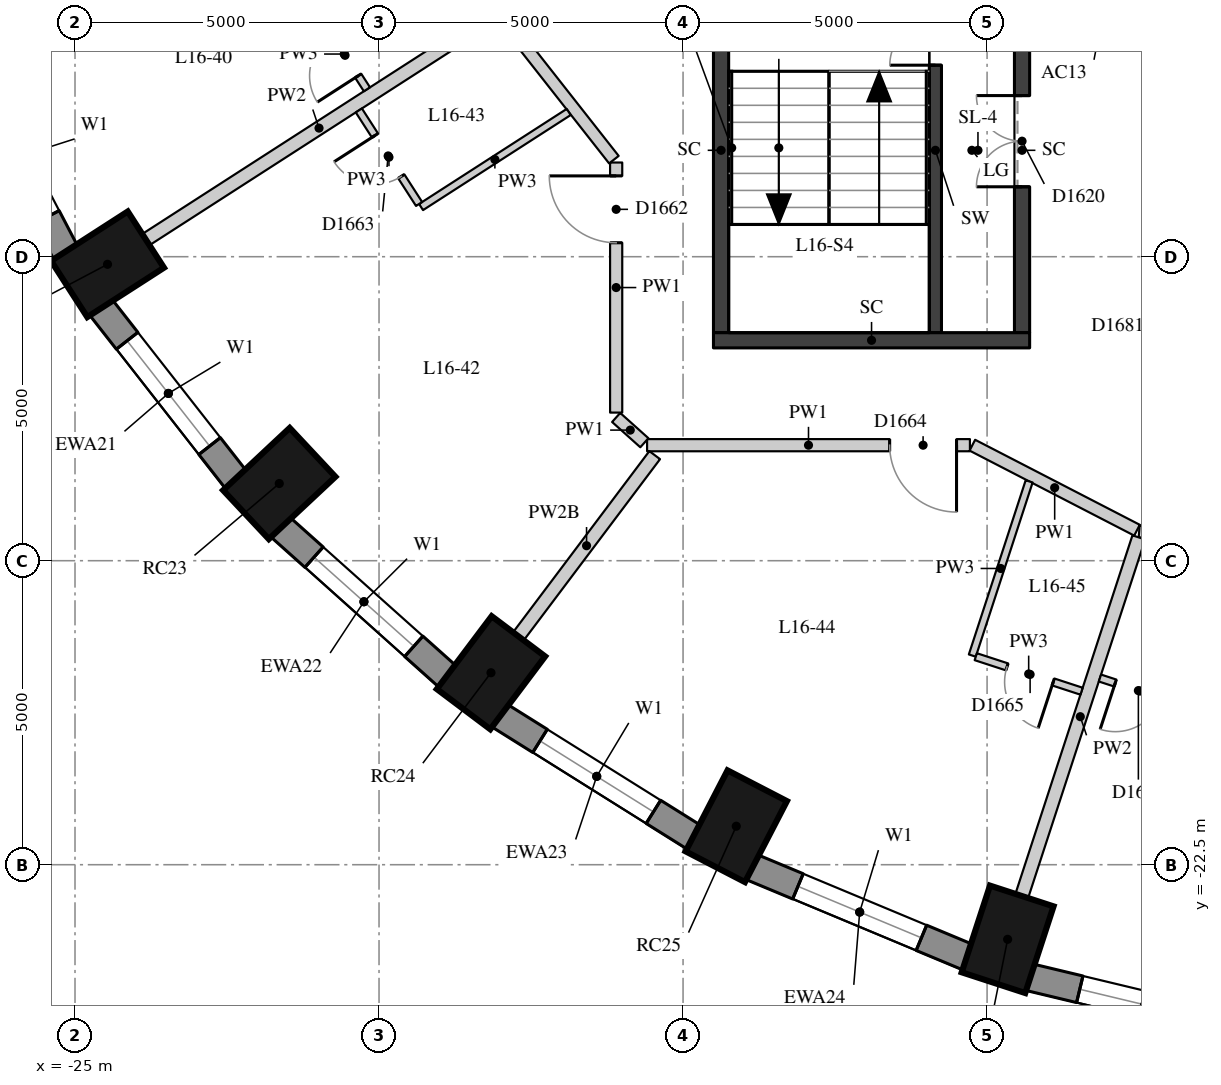
"""IFC4 building model, lengths in metres.
Left out: names, types, materials, properties, quantities, classifications, styles, units other than length and angle.
Written with IfcOpenShell. Run it as: python <this file> out.ifc"""

import sys

from ifc_helpers import new_model, si_unit, direction, frame, frame_2d, origin, origin_2d, place, context, subcontext, project, spatial, rectangle, extrude, element, fill, save


model = new_model("IFC4")
c1 = context("Model", 3, precision=1e-05, world=origin(), true_north=direction((0.0, 1.0)))
c2 = subcontext(c1, "Body", "Model", "MODEL_VIEW")
j1 = project(units=[si_unit("LENGTHUNIT", "METRE"), si_unit("PLANEANGLEUNIT", "RADIAN")], contexts=[c1])
p1 = place(None, origin())
s1 = spatial("IfcSite", under=j1, at=p1, CompositionType="ELEMENT")
p2 = place(p1, origin())
s2 = spatial("IfcBuilding", under=s1, at=p2, CompositionType="ELEMENT")
p3 = place(p2, frame((0.0, 0.0, 61.3)))
s3 = spatial("IfcBuildingStorey", under=s2, at=p3, CompositionType="ELEMENT", Elevation=61.3)
for number, where, z_axis, x_axis in (
    (1, (-24.465, -12.625, 0.0), (0.0, 0.0, 1.0), (-0.841, -0.541, 0.0)),
    (2, (-21.641, -16.23, 0.0), (0.0, 0.0, 1.0), (-0.73, -0.683, 0.0)),
    (3, (-18.159, -19.343, 0.0), (0.0, 0.0, 1.0), (-0.601, -0.799, 0.0)),
    (4, (-14.125, -21.867, 0.0), (0.0, 0.0, 1.0), (-0.46, -0.888, 0.0)),
    (5, (-9.662, -23.727, 0.0), (0.0, 0.0, 1.0), (-0.31, -0.951, 0.0)),
):
    element("IfcColumn", number, at=place(p3, frame(where, z_axis=z_axis, x_axis=x_axis)), inside=s3, PredefinedType="COLUMN", context=c2, shape_type="SweptSolid", body=[
        extrude(rectangle(XDim=1.5, YDim=1.1, at=origin_2d()), origin(), (0.0, 0.0, 1.0), 3.3),
    ])
p4 = place(p3, frame((-26.786, -9.305, 0.0), z_axis=(0.0, 0.0, 1.0), x_axis=(0.462492775226, -0.886623050041, 0.0)))
e6 = element("IfcWall", 6, at=p4, inside=s3, PredefinedType="SOLIDWALL", context=c2, shape_type="SweptSolid", body=[
    extrude(rectangle(XDim=3.532, YDim=0.45, at=frame_2d((1.766, 0.0))), origin(), (0.0, 0.0, 1.0), 3.02),
])
p5 = place(p4, frame((0.666, 0.0, 0.4)))
e7 = element("IfcOpeningElement", 7, at=p5, cuts=e6, PredefinedType="OPENING", context=c2, shape_type="SweptSolid", body=[
    extrude(rectangle(XDim=2.2, YDim=1.75, at=frame_2d((1.1, 0.875))), frame((0.0, 0.235, 0.0), z_axis=(0.0, -1.0, 0.0), x_axis=(1.0, 0.0, 0.0)), (0.0, 0.0, 1.0), 0.47),
])
p6 = place(p3, frame((-24.578, -13.328, 0.0), z_axis=(0.0, 0.0, 1.0), x_axis=(0.616661975264, -0.787228053529, 0.0)))
e8 = element("IfcWall", 8, at=p6, inside=s3, PredefinedType="SOLIDWALL", context=c2, shape_type="SweptSolid", body=[
    extrude(rectangle(XDim=3.61, YDim=0.45, at=frame_2d((1.805, 0.0))), origin(), (0.0, 0.0, 1.0), 3.02),
])
p7 = place(p6, frame((0.705, 0.0, 0.4)))
e9 = element("IfcOpeningElement", 9, at=p7, cuts=e8, PredefinedType="OPENING", context=c2, shape_type="SweptSolid", body=[
    extrude(rectangle(XDim=2.2, YDim=1.75, at=frame_2d((1.1, 0.875))), frame((0.0, 0.235, 0.0), z_axis=(0.0, -1.0, 0.0), x_axis=(1.0, 0.0, 0.0)), (0.0, 0.0, 1.0), 0.47),
])
p8 = place(p3, frame((-21.627, -16.943, 0.0), z_axis=(0.0, 0.0, 1.0), x_axis=(0.745526233716, -0.66647628228, 0.0)))
e10 = element("IfcWall", 10, at=p8, inside=s3, PredefinedType="SOLIDWALL", context=c2, shape_type="SweptSolid", body=[
    extrude(rectangle(XDim=3.697, YDim=0.45, at=frame_2d((1.848, 0.0))), origin(), (0.0, 0.0, 1.0), 3.02),
])
p9 = place(p8, frame((0.749, 0.0, 0.4)))
e11 = element("IfcOpeningElement", 11, at=p9, cuts=e10, PredefinedType="OPENING", context=c2, shape_type="SweptSolid", body=[
    extrude(rectangle(XDim=2.2, YDim=1.75, at=frame_2d((1.1, 0.875))), frame((0.0, 0.235, 0.0), z_axis=(0.0, -1.0, 0.0), x_axis=(1.0, 0.0, 0.0)), (0.0, 0.0, 1.0), 0.47),
])
p10 = place(p3, frame((-18.023, -20.044, 0.0), z_axis=(0.0, 0.0, 1.0), x_axis=(0.847635480093, -0.530579016629, 0.0)))
e12 = element("IfcWall", 12, at=p10, inside=s3, PredefinedType="SOLIDWALL", context=c2, shape_type="SweptSolid", body=[
    extrude(rectangle(XDim=3.782, YDim=0.45, at=frame_2d((1.891, 0.0))), origin(), (0.0, 0.0, 1.0), 3.02),
])
p11 = place(p10, frame((0.791, 0.0, 0.4)))
e13 = element("IfcOpeningElement", 13, at=p11, cuts=e12, PredefinedType="OPENING", context=c2, shape_type="SweptSolid", body=[
    extrude(rectangle(XDim=2.2, YDim=1.75, at=frame_2d((1.1, 0.875))), frame((0.0, 0.235, 0.0), z_axis=(0.0, -1.0, 0.0), x_axis=(1.0, 0.0, 0.0)), (0.0, 0.0, 1.0), 0.47),
])
p12 = place(p3, frame((-13.875, -22.537, 0.0), z_axis=(0.0, 0.0, 1.0), x_axis=(0.923031964282, -0.384723267966, 0.0)))
e14 = element("IfcWall", 14, at=p12, inside=s3, PredefinedType="SOLIDWALL", context=c2, shape_type="SweptSolid", body=[
    extrude(rectangle(XDim=3.856, YDim=0.45, at=frame_2d((1.928, 0.0))), origin(), (0.0, 0.0, 1.0), 3.02),
])
p13 = place(p12, frame((0.828, 0.0, 0.4)))
e15 = element("IfcOpeningElement", 15, at=p13, cuts=e14, PredefinedType="OPENING", context=c2, shape_type="SweptSolid", body=[
    extrude(rectangle(XDim=2.2, YDim=1.75, at=frame_2d((1.1, 0.875))), frame((0.0, 0.235, 0.0), z_axis=(0.0, -1.0, 0.0), x_axis=(1.0, 0.0, 0.0)), (0.0, 0.0, 1.0), 0.47),
])
p14 = place(p3, frame((-9.308, -24.35, 0.0), z_axis=(0.0, 0.0, 1.0), x_axis=(0.972496561493, -0.232917233979, 0.0)))
e16 = element("IfcWall", 16, at=p14, inside=s3, PredefinedType="SOLIDWALL", context=c2, shape_type="SweptSolid", body=[
    extrude(rectangle(XDim=3.911, YDim=0.45, at=frame_2d((1.956, 0.0))), origin(), (0.0, 0.0, 1.0), 3.02),
])
p15 = place(p14, frame((0.855, 0.0, 0.4)))
e17 = element("IfcOpeningElement", 17, at=p15, cuts=e16, PredefinedType="OPENING", context=c2, shape_type="SweptSolid", body=[
    extrude(rectangle(XDim=2.2, YDim=1.75, at=frame_2d((1.1, 0.875))), frame((0.0, 0.235, 0.0), z_axis=(0.0, -1.0, 0.0), x_axis=(1.0, 0.0, 0.0)), (0.0, 0.0, 1.0), 0.47),
])
p16 = place(p3, frame((-10.85, -13.75, 0.0), z_axis=(0.0, 0.0, 1.0), x_axis=(0.0, 1.0, 0.0)))
e18 = element("IfcWall", 18, at=p16, inside=s3, PredefinedType="SHEAR", context=c2, shape_type="SweptSolid", body=[
    extrude(rectangle(XDim=6.0, YDim=0.2, at=frame_2d((3.0, 0.0))), origin(), (0.0, 0.0, 1.0), 3.02),
])
p17 = place(p16, frame((4.4, 0.0, 0.0)))
e19 = element("IfcOpeningElement", 19, at=p17, cuts=e18, PredefinedType="OPENING", context=c2, shape_type="SweptSolid", body=[
    extrude(rectangle(XDim=1.5, YDim=2.1, at=frame_2d((0.75, 1.05))), frame((0.0, 0.11, 0.0), z_axis=(0.0, -1.0, 0.0), x_axis=(1.0, 0.0, 0.0)), (0.0, 0.0, 1.0), 0.22),
])
p18 = place(p3, frame((-14.375, -13.75, -0.28), z_axis=(0.0, 0.0, 1.0), x_axis=(0.0, 1.0, 0.0)))
e20 = element("IfcWall", 20, at=p18, inside=s3, PredefinedType="SHEAR", context=c2, shape_type="SweptSolid", body=[
    extrude(rectangle(XDim=6.0, YDim=0.25, at=frame_2d((3.0, 0.0))), origin(), (0.0, 0.0, 1.0), 3.3),
])
p19 = place(p3, frame((-9.425, -13.75, -0.28), z_axis=(0.0, 0.0, 1.0), x_axis=(0.0, 1.0, 0.0)))
e21 = element("IfcWall", 21, at=p19, inside=s3, PredefinedType="SHEAR", context=c2, shape_type="SweptSolid", body=[
    extrude(rectangle(XDim=6.0, YDim=0.25, at=frame_2d((3.0, 0.0))), origin(), (0.0, 0.0, 1.0), 3.3),
])
p20 = place(p19, frame((2.4, 0.0, 0.28)))
e22 = element("IfcOpeningElement", 22, at=p20, cuts=e21, PredefinedType="OPENING", context=c2, shape_type="SweptSolid", body=[
    extrude(rectangle(XDim=1.5, YDim=2.1, at=frame_2d((0.75, 1.05))), frame((0.0, 0.135, 0.0), z_axis=(0.0, -1.0, 0.0), x_axis=(1.0, 0.0, 0.0)), (0.0, 0.0, 1.0), 0.27),
])
p21 = place(p3, frame((-14.5, -13.875, -0.28), z_axis=(0.0, 0.0, 1.0), x_axis=(1.0, 0.0, 0.0)))
e23 = element("IfcWall", 23, at=p21, inside=s3, PredefinedType="SHEAR", context=c2, shape_type="SweptSolid", body=[
    extrude(rectangle(XDim=5.2, YDim=0.25, at=frame_2d((2.6, 0.0))), origin(), (0.0, 0.0, 1.0), 3.3),
])
p22 = place(p3, frame((3.778, -17.898, 0.0), z_axis=(0.0, 0.0, 1.0), x_axis=(-0.996963005503, 0.077876605336, 0.0)))
e24 = element("IfcWall", 24, at=p22, inside=s3, PredefinedType="PARTITIONING", context=c2, shape_type="SweptSolid", body=[
    extrude(rectangle(XDim=11.311, YDim=0.2, at=frame_2d((5.656, 0.0))), origin(), (0.0, 0.0, 1.0), 3.02),
])
p23 = place(p22, frame((8.33, 0.0, 0.0)))
e25 = element("IfcOpeningElement", 25, at=p23, cuts=e24, PredefinedType="OPENING", context=c2, shape_type="SweptSolid", body=[
    extrude(rectangle(XDim=1.0, YDim=2.1, at=frame_2d((0.5, 1.05))), frame((0.0, 0.11, 0.0), z_axis=(0.0, -1.0, 0.0), x_axis=(1.0, 0.0, 0.0)), (0.0, 0.0, 1.0), 0.22),
])
p24 = place(p22, frame((5.77, 0.0, 0.0)))
e26 = element("IfcOpeningElement", 26, at=p24, cuts=e24, PredefinedType="OPENING", context=c2, shape_type="SweptSolid", body=[
    extrude(rectangle(XDim=1.0, YDim=2.1, at=frame_2d((0.5, 1.05))), frame((0.0, 0.11, 0.0), z_axis=(0.0, -1.0, 0.0), x_axis=(1.0, 0.0, 0.0)), (0.0, 0.0, 1.0), 0.22),
])
p25 = place(p22, frame((1.45, 0.0, 0.0)))
e27 = element("IfcOpeningElement", 27, at=p25, cuts=e24, PredefinedType="OPENING", context=c2, shape_type="SweptSolid", body=[
    extrude(rectangle(XDim=0.9, YDim=2.1, at=frame_2d((0.45, 1.05))), frame((0.0, 0.11, 0.0), z_axis=(0.0, -1.0, 0.0), x_axis=(1.0, 0.0, 0.0)), (0.0, 0.0, 1.0), 0.22),
])
p26 = place(p3, frame((-7.534, -16.998, 0.0), z_axis=(0.0, 0.0, 1.0), x_axis=(-0.888535328052, 0.458808206992, 0.0)))
e28 = element("IfcWall", 28, at=p26, inside=s3, PredefinedType="PARTITIONING", context=c2, shape_type="SweptSolid", body=[
    extrude(rectangle(XDim=3.047, YDim=0.2, at=frame_2d((1.524, 0.0))), origin(), (0.0, 0.0, 1.0), 3.02),
])
p27 = place(p3, frame((-10.282, -15.6, 0.0), z_axis=(0.0, 0.0, 1.0), x_axis=(-1.0, 0.0, 0.0)))
e29 = element("IfcWall", 29, at=p27, inside=s3, PredefinedType="PARTITIONING", context=c2, shape_type="SweptSolid", body=[
    extrude(rectangle(XDim=5.309, YDim=0.2, at=frame_2d((2.655, 0.0))), origin(), (0.0, 0.0, 1.0), 3.02),
])
p28 = place(p27, frame((0.22, 0.0, 0.0)))
e30 = element("IfcOpeningElement", 30, at=p28, cuts=e29, PredefinedType="OPENING", context=c2, shape_type="SweptSolid", body=[
    extrude(rectangle(XDim=1.1, YDim=2.1, at=frame_2d((0.55, 1.05))), frame((0.0, 0.11, 0.0), z_axis=(0.0, -1.0, 0.0), x_axis=(1.0, 0.0, 0.0)), (0.0, 0.0, 1.0), 0.22),
])
p29 = place(p3, frame((-15.636, -15.56, 0.0), z_axis=(0.0, 0.0, 1.0), x_axis=(-0.744656758283, 0.667447610187, 0.0)))
e31 = element("IfcWall", 31, at=p29, inside=s3, PredefinedType="PARTITIONING", context=c2, shape_type="SweptSolid", body=[
    extrude(rectangle(XDim=0.623, YDim=0.2, at=frame_2d((0.312, 0.0))), origin(), (0.0, 0.0, 1.0), 3.02),
])
p30 = place(p3, frame((-16.1, -15.064, 0.0), z_axis=(0.0, 0.0, 1.0), x_axis=(0.0, 1.0, 0.0)))
e32 = element("IfcWall", 32, at=p30, inside=s3, PredefinedType="PARTITIONING", context=c2, shape_type="SweptSolid", body=[
    extrude(rectangle(XDim=4.113, YDim=0.2, at=frame_2d((2.057, 0.0))), origin(), (0.0, 0.0, 1.0), 3.02),
])
p31 = place(p30, frame((2.793, 0.0, 0.0)))
e33 = element("IfcOpeningElement", 33, at=p31, cuts=e32, PredefinedType="OPENING", context=c2, shape_type="SweptSolid", body=[
    extrude(rectangle(XDim=1.1, YDim=2.1, at=frame_2d((0.55, 1.05))), frame((0.0, 0.11, 0.0), z_axis=(0.0, -1.0, 0.0), x_axis=(1.0, 0.0, 0.0)), (0.0, 0.0, 1.0), 0.22),
])
p32 = place(p3, frame((-16.137, -10.904, 0.0), z_axis=(0.0, 0.0, 1.0), x_axis=(-0.617888403737, 0.786265807808, 0.0)))
e34 = element("IfcWall", 34, at=p32, inside=s3, PredefinedType="PARTITIONING", context=c2, shape_type="SweptSolid", body=[
    extrude(rectangle(XDim=6.29, YDim=0.2, at=frame_2d((3.145, 0.0))), origin(), (0.0, 0.0, 1.0), 3.02),
])
p33 = place(p32, frame((5.07, 0.0, 0.0)))
e35 = element("IfcOpeningElement", 35, at=p33, cuts=e34, PredefinedType="OPENING", context=c2, shape_type="SweptSolid", body=[
    extrude(rectangle(XDim=1.0, YDim=2.1, at=frame_2d((0.5, 1.05))), frame((0.0, 0.11, 0.0), z_axis=(0.0, -1.0, 0.0), x_axis=(1.0, 0.0, 0.0)), (0.0, 0.0, 1.0), 0.22),
])
p34 = place(p3, frame((-23.835, -12.219, 0.0), z_axis=(0.0, 0.0, 1.0), x_axis=(0.840749666863, 0.541424046076, 0.0)))
e36 = element("IfcWall", 36, at=p34, inside=s3, PredefinedType="PARTITIONING", context=c2, shape_type="SweptSolid", body=[
    extrude(rectangle(XDim=6.775, YDim=0.22, at=frame_2d((3.387, 0.0))), origin(), (0.0, 0.0, 1.0), 3.02),
])
p35 = place(p3, frame((-17.708, -18.743, 0.0), z_axis=(0.0, 0.0, 1.0), x_axis=(0.601172757903, 0.799119086967, 0.0)))
e37 = element("IfcWall", 37, at=p35, inside=s3, PredefinedType="PARTITIONING", context=c2, shape_type="SweptSolid", body=[
    extrude(rectangle(XDim=3.729, YDim=0.22, at=frame_2d((1.864, 0.0))), origin(), (0.0, 0.0, 1.0), 2.57),
])
p36 = place(p3, frame((-9.429, -23.014, 0.0), z_axis=(0.0, 0.0, 1.0), x_axis=(0.310235573501, 0.950659712481, 0.0)))
e38 = element("IfcWall", 38, at=p36, inside=s3, PredefinedType="PARTITIONING", context=c2, shape_type="SweptSolid", body=[
    extrude(rectangle(XDim=6.204, YDim=0.22, at=frame_2d((3.102, 0.0))), origin(), (0.0, 0.0, 1.0), 3.02),
])
p37 = place(p3, frame((-16.881, -10.12, 0.0), z_axis=(0.0, 0.0, 1.0), x_axis=(-0.840749755927, -0.541423907773, 0.0)))
e39 = element("IfcWall", 39, at=p37, inside=s3, PredefinedType="PARTITIONING", context=c2, shape_type="SweptSolid", body=[
    extrude(rectangle(XDim=2.888, YDim=0.12, at=frame_2d((1.444, 0.0))), origin(), (0.0, 0.0, 1.0), 3.02),
])
p38 = place(p3, frame((-9.308, -16.195, 0.0), z_axis=(0.0, 0.0, 1.0), x_axis=(-0.310170219214, -0.950681037527, 0.0)))
e40 = element("IfcWall", 40, at=p38, inside=s3, PredefinedType="PARTITIONING", context=c2, shape_type="SweptSolid", body=[
    extrude(rectangle(XDim=3.014, YDim=0.12, at=frame_2d((1.507, 0.0))), origin(), (0.0, 0.0, 1.0), 3.02),
])
p39 = place(p3, frame((-20.946, -8.587, 0.0), z_axis=(0.0, 0.0, 1.0), x_axis=(0.541526323973, -0.840683793375, 0.0)))
e41 = element("IfcWall", 41, at=p39, inside=s3, PredefinedType="PARTITIONING", context=c2, shape_type="SweptSolid", body=[
    extrude(rectangle(XDim=1.38, YDim=0.12, at=frame_2d((0.69, 0.0))), origin(), (0.0, 0.0, 1.0), 3.02),
])
p40 = place(p39, frame((0.315, 0.0, 0.0)))
e42 = element("IfcOpeningElement", 42, at=p40, cuts=e41, PredefinedType="OPENING", context=c2, shape_type="SweptSolid", body=[
    extrude(rectangle(XDim=0.8, YDim=2.1, at=frame_2d((0.4, 1.05))), frame((0.0, 0.07, 0.0), z_axis=(0.0, -1.0, 0.0), x_axis=(1.0, 0.0, 0.0)), (0.0, 0.0, 1.0), 0.14),
])
p41 = place(p3, frame((-19.341, -11.633, 0.0), z_axis=(0.0, 0.0, 1.0), x_axis=(-0.541391271501, 0.840770772055, 0.0)))
e43 = element("IfcWall", 43, at=p41, inside=s3, PredefinedType="PARTITIONING", context=c2, shape_type="SweptSolid", body=[
    extrude(rectangle(XDim=1.83, YDim=0.12, at=frame_2d((0.915, 0.0))), origin(), (0.0, 0.0, 1.0), 3.02),
])
p42 = place(p41, frame((0.54, 0.0, 0.0)))
e44 = element("IfcOpeningElement", 44, at=p42, cuts=e43, PredefinedType="OPENING", context=c2, shape_type="SweptSolid", body=[
    extrude(rectangle(XDim=0.8, YDim=2.1, at=frame_2d((0.4, 1.05))), frame((0.0, 0.07, 0.0), z_axis=(0.0, -1.0, 0.0), x_axis=(1.0, 0.0, 0.0)), (0.0, 0.0, 1.0), 0.14),
])
p43 = place(p3, frame((-10.186, -19.079, 0.0), z_axis=(0.0, 0.0, 1.0), x_axis=(0.950678536911, -0.31017788357, 0.0)))
e45 = element("IfcWall", 45, at=p43, inside=s3, PredefinedType="PARTITIONING", context=c2, shape_type="SweptSolid", body=[
    extrude(rectangle(XDim=1.83, YDim=0.12, at=frame_2d((0.915, 0.0))), origin(), (0.0, 0.0, 1.0), 3.02),
])
p44 = place(p43, frame((0.54, 0.0, 0.0)))
e46 = element("IfcOpeningElement", 46, at=p44, cuts=e45, PredefinedType="OPENING", context=c2, shape_type="SweptSolid", body=[
    extrude(rectangle(XDim=0.8, YDim=2.1, at=frame_2d((0.4, 1.05))), frame((0.0, 0.07, 0.0), z_axis=(0.0, -1.0, 0.0), x_axis=(1.0, 0.0, 0.0)), (0.0, 0.0, 1.0), 0.14),
])
p45 = place(p3, frame((-6.832, -19.858, 0.0), z_axis=(0.0, 0.0, 1.0), x_axis=(-0.950645927723, 0.31027781117, 0.0)))
e47 = element("IfcWall", 47, at=p45, inside=s3, PredefinedType="PARTITIONING", context=c2, shape_type="SweptSolid", body=[
    extrude(rectangle(XDim=1.38, YDim=0.12, at=frame_2d((0.69, 0.0))), origin(), (0.0, 0.0, 1.0), 3.02),
])
p46 = place(p45, frame((0.315, 0.0, 0.0)))
e48 = element("IfcOpeningElement", 48, at=p46, cuts=e47, PredefinedType="OPENING", context=c2, shape_type="SweptSolid", body=[
    extrude(rectangle(XDim=0.8, YDim=2.1, at=frame_2d((0.4, 1.05))), frame((0.0, 0.07, 0.0), z_axis=(0.0, -1.0, 0.0), x_axis=(1.0, 0.0, 0.0)), (0.0, 0.0, 1.0), 0.14),
])
p47 = place(p7, origin())
e49 = element("IfcWindow", 49, at=p47, inside=s3, PartitioningType="SINGLE_PANEL", PredefinedType="WINDOW", context=c2, shape_type="SweptSolid", body=[
    extrude(rectangle(XDim=2.2, YDim=1.75, at=frame_2d((1.1, 0.875))), frame((0.0, 0.035, 0.0), z_axis=(0.0, -1.0, 0.0), x_axis=(1.0, 0.0, 0.0)), (0.0, 0.0, 1.0), 0.06),
])
fill(e9, e49)
p48 = place(p9, origin())
e50 = element("IfcWindow", 50, at=p48, inside=s3, PartitioningType="SINGLE_PANEL", PredefinedType="WINDOW", context=c2, shape_type="SweptSolid", body=[
    extrude(rectangle(XDim=2.2, YDim=1.75, at=frame_2d((1.1, 0.875))), frame((0.0, 0.035, 0.0), z_axis=(0.0, -1.0, 0.0), x_axis=(1.0, 0.0, 0.0)), (0.0, 0.0, 1.0), 0.06),
])
fill(e11, e50)
p49 = place(p11, origin())
e51 = element("IfcWindow", 51, at=p49, inside=s3, PartitioningType="SINGLE_PANEL", PredefinedType="WINDOW", context=c2, shape_type="SweptSolid", body=[
    extrude(rectangle(XDim=2.2, YDim=1.75, at=frame_2d((1.1, 0.875))), frame((0.0, 0.035, 0.0), z_axis=(0.0, -1.0, 0.0), x_axis=(1.0, 0.0, 0.0)), (0.0, 0.0, 1.0), 0.06),
])
fill(e13, e51)
p50 = place(p13, origin())
e52 = element("IfcWindow", 52, at=p50, inside=s3, PartitioningType="SINGLE_PANEL", PredefinedType="WINDOW", context=c2, shape_type="SweptSolid", body=[
    extrude(rectangle(XDim=2.2, YDim=1.75, at=frame_2d((1.1, 0.875))), frame((0.0, 0.035, 0.0), z_axis=(0.0, -1.0, 0.0), x_axis=(1.0, 0.0, 0.0)), (0.0, 0.0, 1.0), 0.06),
])
fill(e15, e52)
p51 = place(p15, origin())
e53 = element("IfcWindow", 53, at=p51, inside=s3, PartitioningType="SINGLE_PANEL", PredefinedType="WINDOW", context=c2, shape_type="SweptSolid", body=[
    extrude(rectangle(XDim=2.2, YDim=1.75, at=frame_2d((1.1, 0.875))), frame((0.0, 0.035, 0.0), z_axis=(0.0, -1.0, 0.0), x_axis=(1.0, 0.0, 0.0)), (0.0, 0.0, 1.0), 0.06),
])
fill(e17, e53)
p52 = place(p17, origin())
e54 = element("IfcDoor", 54, at=p52, inside=s3, OperationType="DOUBLE_DOOR_SINGLE_SWING", PredefinedType="DOOR", context=c2, shape_type="SweptSolid", body=[
    extrude(rectangle(XDim=1.5, YDim=2.1, at=frame_2d((0.75, 1.05))), frame((0.0, 0.025, 0.0), z_axis=(0.0, -1.0, 0.0), x_axis=(1.0, 0.0, 0.0)), (0.0, 0.0, 1.0), 0.05),
])
fill(e19, e54)
p53 = place(p20, origin())
e55 = element("IfcDoor", 55, at=p53, inside=s3, OperationType="DOUBLE_DOOR_SINGLE_SWING", PredefinedType="DOOR", context=c2, shape_type="SweptSolid", body=[
    extrude(rectangle(XDim=1.5, YDim=2.1, at=frame_2d((0.75, 1.05))), frame((0.0, 0.025, 0.0), z_axis=(0.0, -1.0, 0.0), x_axis=(1.0, 0.0, 0.0)), (0.0, 0.0, 1.0), 0.05),
])
fill(e22, e55)
p54 = place(p40, origin())
e56 = element("IfcDoor", 56, at=p54, inside=s3, OperationType="SINGLE_SWING_LEFT", PredefinedType="DOOR", context=c2, shape_type="SweptSolid", body=[
    extrude(rectangle(XDim=0.8, YDim=2.1, at=frame_2d((0.4, 1.05))), frame((0.0, 0.025, 0.0), z_axis=(0.0, -1.0, 0.0), x_axis=(1.0, 0.0, 0.0)), (0.0, 0.0, 1.0), 0.05),
])
fill(e42, e56)
p55 = place(p31, origin())
e57 = element("IfcDoor", 57, at=p55, inside=s3, OperationType="SINGLE_SWING_RIGHT", PredefinedType="DOOR", context=c2, shape_type="SweptSolid", body=[
    extrude(rectangle(XDim=1.1, YDim=2.1, at=frame_2d((0.55, 1.05))), frame((0.0, 0.025, 0.0), z_axis=(0.0, -1.0, 0.0), x_axis=(1.0, 0.0, 0.0)), (0.0, 0.0, 1.0), 0.05),
])
fill(e33, e57)
p56 = place(p42, origin())
e58 = element("IfcDoor", 58, at=p56, inside=s3, OperationType="SINGLE_SWING_RIGHT", PredefinedType="DOOR", context=c2, shape_type="SweptSolid", body=[
    extrude(rectangle(XDim=0.8, YDim=2.1, at=frame_2d((0.4, 1.05))), frame((0.0, 0.025, 0.0), z_axis=(0.0, -1.0, 0.0), x_axis=(1.0, 0.0, 0.0)), (0.0, 0.0, 1.0), 0.05),
])
fill(e44, e58)
p57 = place(p28, origin())
e59 = element("IfcDoor", 59, at=p57, inside=s3, OperationType="SINGLE_SWING_LEFT", PredefinedType="DOOR", context=c2, shape_type="SweptSolid", body=[
    extrude(rectangle(XDim=1.1, YDim=2.1, at=frame_2d((0.55, 1.05))), frame((0.0, 0.025, 0.0), z_axis=(0.0, -1.0, 0.0), x_axis=(1.0, 0.0, 0.0)), (0.0, 0.0, 1.0), 0.05),
])
fill(e30, e59)
p58 = place(p44, origin())
e60 = element("IfcDoor", 60, at=p58, inside=s3, OperationType="SINGLE_SWING_LEFT", PredefinedType="DOOR", context=c2, shape_type="SweptSolid", body=[
    extrude(rectangle(XDim=0.8, YDim=2.1, at=frame_2d((0.4, 1.05))), frame((0.0, 0.025, 0.0), z_axis=(0.0, -1.0, 0.0), x_axis=(1.0, 0.0, 0.0)), (0.0, 0.0, 1.0), 0.05),
])
fill(e46, e60)
p59 = place(p46, origin())
e61 = element("IfcDoor", 61, at=p59, inside=s3, OperationType="SINGLE_SWING_RIGHT", PredefinedType="DOOR", context=c2, shape_type="SweptSolid", body=[
    extrude(rectangle(XDim=0.8, YDim=2.1, at=frame_2d((0.4, 1.05))), frame((0.0, 0.025, 0.0), z_axis=(0.0, -1.0, 0.0), x_axis=(1.0, 0.0, 0.0)), (0.0, 0.0, 1.0), 0.05),
])
fill(e48, e61)
save(model, sys.argv[1])
